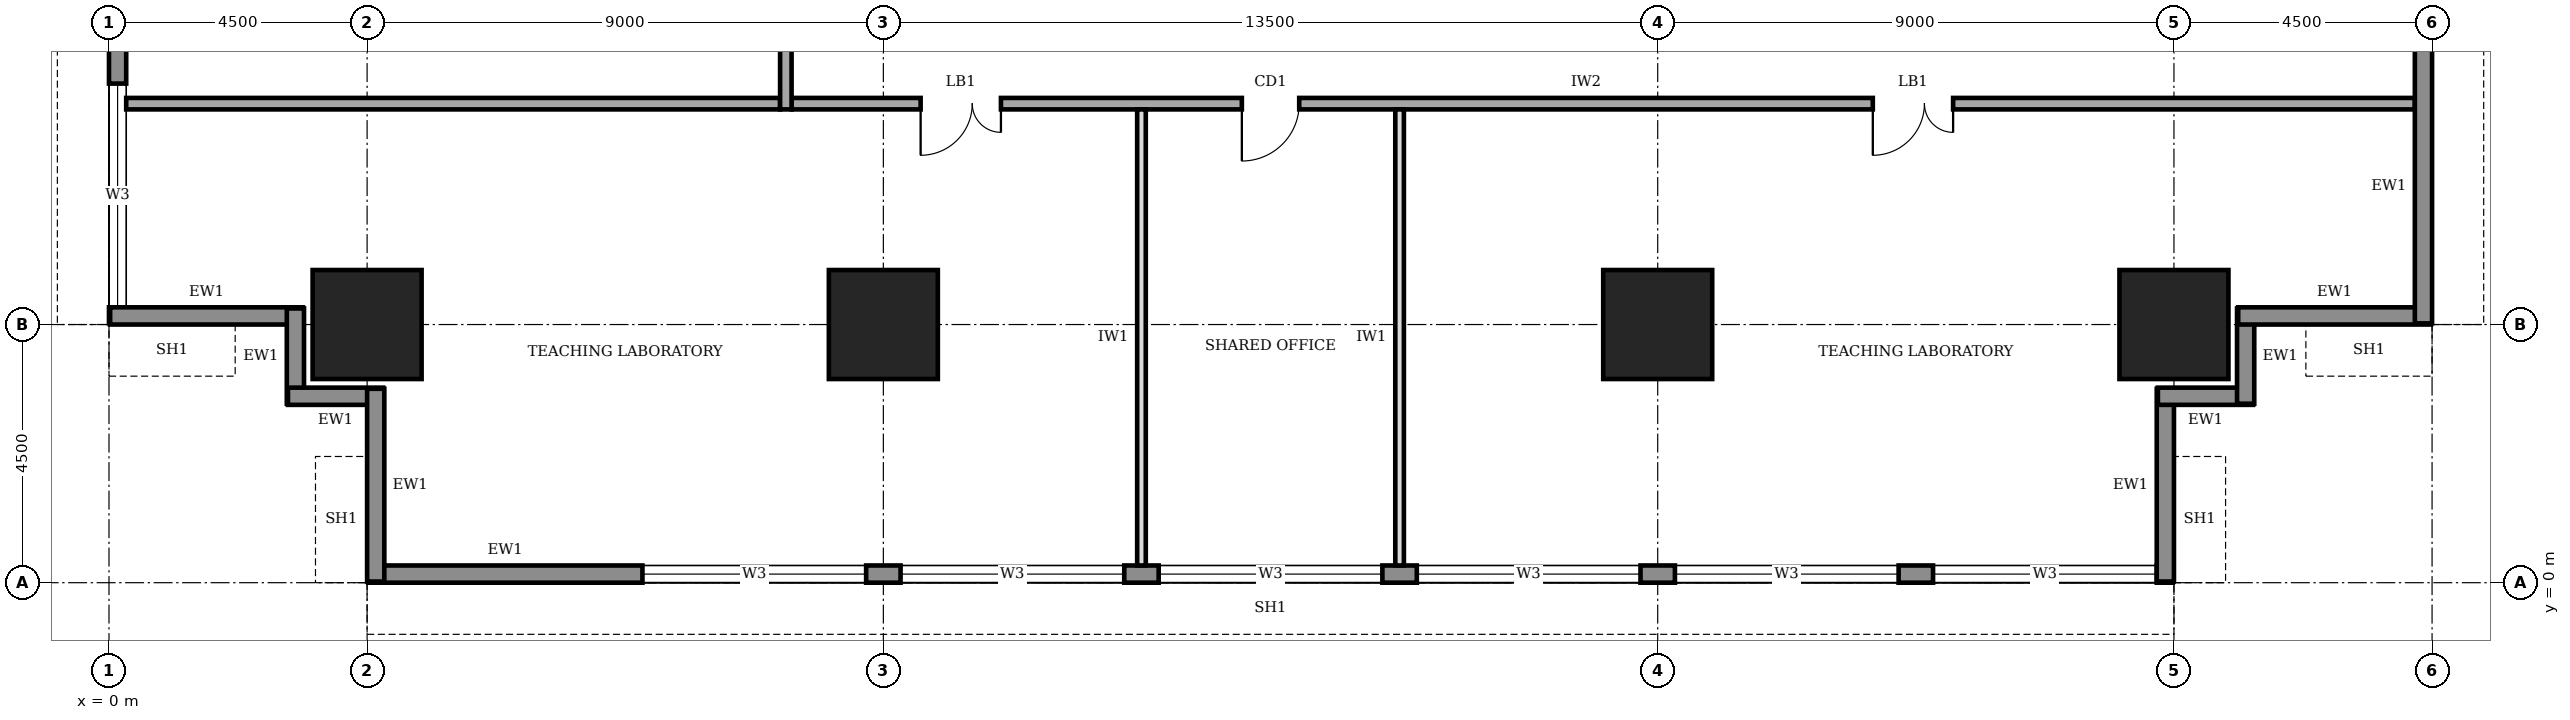
"""IFC4 building model, lengths in metres.
Left out: names, types, materials, properties, quantities, classifications, styles, units other than length and angle.
Written with IfcOpenShell. Run it as: python <this file> out.ifc"""

import sys

from ifc_helpers import new_model, si_unit, direction, frame, frame_2d, origin, origin_2d, place, context, subcontext, project, spatial, rectangle, extrude, element, fill, save


model = new_model("IFC4")
c1 = context("Model", 3, precision=1e-05, world=origin(), true_north=direction((0.0, 1.0)))
c2 = subcontext(c1, "Body", "Model", "MODEL_VIEW")
j1 = project(units=[si_unit("LENGTHUNIT", "METRE"), si_unit("PLANEANGLEUNIT", "RADIAN")], contexts=[c1])
p1 = place(None, origin())
s1 = spatial("IfcSite", under=j1, at=p1, CompositionType="ELEMENT")
p2 = place(p1, origin())
s2 = spatial("IfcBuilding", under=s1, at=p2, CompositionType="ELEMENT")
p3 = place(p2, frame((0.0, 0.0, 97.0)))
s3 = spatial("IfcBuildingStorey", under=s2, at=p3, CompositionType="ELEMENT", Elevation=97.0)
for number, where, z_axis, x_axis in (
    (1, (4.5, 4.5, 0.0), (0.0, 0.0, 1.0), (1.0, 0.0, 0.0)),
    (2, (13.5, 4.5, 0.0), (0.0, 0.0, 1.0), (1.0, 0.0, 0.0)),
    (3, (27.0, 4.5, 0.0), (0.0, 0.0, 1.0), (1.0, 0.0, 0.0)),
    (4, (36.0, 4.5, 0.0), (0.0, 0.0, 1.0), (1.0, 0.0, 0.0)),
):
    element("IfcColumn", number, at=place(p3, frame(where, z_axis=z_axis, x_axis=x_axis)), inside=s3, PredefinedType="COLUMN", context=c2, shape_type="SweptSolid", body=[
        extrude(rectangle(XDim=1.9, YDim=1.9, at=origin_2d()), origin(), (0.0, 0.0, 1.0), 4.0),
    ])
p4 = place(p3, frame((4.52, 0.15, 0.0), z_axis=(0.0, 0.0, 1.0), x_axis=(1.0, 0.0, 0.0)))
e5 = element("IfcWall", 5, at=p4, inside=s3, PredefinedType="STANDARD", context=c2, shape_type="SweptSolid", body=[
    extrude(rectangle(XDim=31.46, YDim=0.3, at=frame_2d((15.73, 0.0))), origin(), (0.0, 0.0, 1.0), 3.75),
])
p5 = place(p4, frame((4.78, 0.0, 0.95)))
e6 = element("IfcOpeningElement", 6, at=p5, cuts=e5, PredefinedType="OPENING", context=c2, shape_type="SweptSolid", body=[
    extrude(rectangle(XDim=3.9, YDim=1.8, at=frame_2d((1.95, 0.9))), frame((0.0, 0.16, 0.0), z_axis=(0.0, -1.0, 0.0), x_axis=(1.0, 0.0, 0.0)), (0.0, 0.0, 1.0), 0.32),
])
p6 = place(p4, frame((9.28, 0.0, 0.95)))
e7 = element("IfcOpeningElement", 7, at=p6, cuts=e5, PredefinedType="OPENING", context=c2, shape_type="SweptSolid", body=[
    extrude(rectangle(XDim=3.9, YDim=1.8, at=frame_2d((1.95, 0.9))), frame((0.0, 0.16, 0.0), z_axis=(0.0, -1.0, 0.0), x_axis=(1.0, 0.0, 0.0)), (0.0, 0.0, 1.0), 0.32),
])
p7 = place(p4, frame((13.78, 0.0, 0.95)))
e8 = element("IfcOpeningElement", 8, at=p7, cuts=e5, PredefinedType="OPENING", context=c2, shape_type="SweptSolid", body=[
    extrude(rectangle(XDim=3.9, YDim=1.8, at=frame_2d((1.95, 0.9))), frame((0.0, 0.16, 0.0), z_axis=(0.0, -1.0, 0.0), x_axis=(1.0, 0.0, 0.0)), (0.0, 0.0, 1.0), 0.32),
])
p8 = place(p4, frame((18.28, 0.0, 0.95)))
e9 = element("IfcOpeningElement", 9, at=p8, cuts=e5, PredefinedType="OPENING", context=c2, shape_type="SweptSolid", body=[
    extrude(rectangle(XDim=3.9, YDim=1.8, at=frame_2d((1.95, 0.9))), frame((0.0, 0.16, 0.0), z_axis=(0.0, -1.0, 0.0), x_axis=(1.0, 0.0, 0.0)), (0.0, 0.0, 1.0), 0.32),
])
p9 = place(p4, frame((22.78, 0.0, 0.95)))
e10 = element("IfcOpeningElement", 10, at=p9, cuts=e5, PredefinedType="OPENING", context=c2, shape_type="SweptSolid", body=[
    extrude(rectangle(XDim=3.9, YDim=1.8, at=frame_2d((1.95, 0.9))), frame((0.0, 0.16, 0.0), z_axis=(0.0, -1.0, 0.0), x_axis=(1.0, 0.0, 0.0)), (0.0, 0.0, 1.0), 0.32),
])
p10 = place(p4, frame((27.28, 0.0, 0.95)))
e11 = element("IfcOpeningElement", 11, at=p10, cuts=e5, PredefinedType="OPENING", context=c2, shape_type="SweptSolid", body=[
    extrude(rectangle(XDim=3.9, YDim=1.8, at=frame_2d((1.95, 0.9))), frame((0.0, 0.16, 0.0), z_axis=(0.0, -1.0, 0.0), x_axis=(1.0, 0.0, 0.0)), (0.0, 0.0, 1.0), 0.32),
])
p11 = place(p3, frame((35.85, 0.02, 0.0), z_axis=(0.0, 0.0, 1.0), x_axis=(0.0, 1.0, 0.0)))
e12 = element("IfcWall", 12, at=p11, inside=s3, PredefinedType="STANDARD", context=c2, shape_type="SweptSolid", body=[
    extrude(rectangle(XDim=3.36, YDim=0.3, at=frame_2d((1.68, 0.0))), origin(), (0.0, 0.0, 1.0), 2.85),
])
for number, where, z_axis, x_axis in (
    (13, (35.72, 3.25, 0.0), (0.0, 0.0, 1.0), (1.0, 0.0, 0.0)),
    (14, (37.25, 3.12, 0.0), (0.0, 0.0, 1.0), (0.0, 1.0, 0.0)),
):
    element("IfcWall", number, at=place(p3, frame(where, z_axis=z_axis, x_axis=x_axis)), inside=s3, PredefinedType="STANDARD", context=c2, shape_type="SweptSolid", body=[
        extrude(rectangle(XDim=1.66, YDim=0.3, at=frame_2d((0.83, 0.0))), origin(), (0.0, 0.0, 1.0), 3.75),
    ])
p12 = place(p3, frame((37.12, 4.65, 0.0), z_axis=(0.0, 0.0, 1.0), x_axis=(1.0, 0.0, 0.0)))
e15 = element("IfcWall", 15, at=p12, inside=s3, PredefinedType="STANDARD", context=c2, shape_type="SweptSolid", body=[
    extrude(rectangle(XDim=3.36, YDim=0.3, at=frame_2d((1.68, 0.0))), origin(), (0.0, 0.0, 1.0), 2.85),
])
p13 = place(p3, frame((40.35, 4.52, 0.0), z_axis=(0.0, 0.0, 1.0), x_axis=(0.0, 1.0, 0.0)))
e16 = element("IfcWall", 16, at=p13, inside=s3, PredefinedType="STANDARD", context=c2, shape_type="SweptSolid", body=[
    extrude(rectangle(XDim=31.46, YDim=0.3, at=frame_2d((15.73, 0.0))), origin(), (0.0, 0.0, 1.0), 3.75),
])
p14 = place(p13, frame((4.78, 0.0, 0.95)))
e17 = element("IfcOpeningElement", 17, at=p14, cuts=e16, PredefinedType="OPENING", context=c2, shape_type="SweptSolid", body=[
    extrude(rectangle(XDim=3.9, YDim=1.8, at=frame_2d((1.95, 0.9))), frame((0.0, 0.16, 0.0), z_axis=(0.0, -1.0, 0.0), x_axis=(1.0, 0.0, 0.0)), (0.0, 0.0, 1.0), 0.32),
])
p15 = place(p13, frame((9.28, 0.0, 0.95)))
e18 = element("IfcOpeningElement", 18, at=p15, cuts=e16, PredefinedType="OPENING", context=c2, shape_type="SweptSolid", body=[
    extrude(rectangle(XDim=3.9, YDim=1.8, at=frame_2d((1.95, 0.9))), frame((0.0, 0.16, 0.0), z_axis=(0.0, -1.0, 0.0), x_axis=(1.0, 0.0, 0.0)), (0.0, 0.0, 1.0), 0.32),
])
p16 = place(p13, frame((13.78, 0.0, 0.95)))
e19 = element("IfcOpeningElement", 19, at=p16, cuts=e16, PredefinedType="OPENING", context=c2, shape_type="SweptSolid", body=[
    extrude(rectangle(XDim=3.9, YDim=1.8, at=frame_2d((1.95, 0.9))), frame((0.0, 0.16, 0.0), z_axis=(0.0, -1.0, 0.0), x_axis=(1.0, 0.0, 0.0)), (0.0, 0.0, 1.0), 0.32),
])
p17 = place(p13, frame((18.28, 0.0, 0.95)))
e20 = element("IfcOpeningElement", 20, at=p17, cuts=e16, PredefinedType="OPENING", context=c2, shape_type="SweptSolid", body=[
    extrude(rectangle(XDim=3.9, YDim=1.8, at=frame_2d((1.95, 0.9))), frame((0.0, 0.16, 0.0), z_axis=(0.0, -1.0, 0.0), x_axis=(1.0, 0.0, 0.0)), (0.0, 0.0, 1.0), 0.32),
])
p18 = place(p13, frame((22.78, 0.0, 0.95)))
e21 = element("IfcOpeningElement", 21, at=p18, cuts=e16, PredefinedType="OPENING", context=c2, shape_type="SweptSolid", body=[
    extrude(rectangle(XDim=3.9, YDim=1.8, at=frame_2d((1.95, 0.9))), frame((0.0, 0.16, 0.0), z_axis=(0.0, -1.0, 0.0), x_axis=(1.0, 0.0, 0.0)), (0.0, 0.0, 1.0), 0.32),
])
p19 = place(p13, frame((27.28, 0.0, 0.95)))
e22 = element("IfcOpeningElement", 22, at=p19, cuts=e16, PredefinedType="OPENING", context=c2, shape_type="SweptSolid", body=[
    extrude(rectangle(XDim=3.9, YDim=1.8, at=frame_2d((1.95, 0.9))), frame((0.0, 0.16, 0.0), z_axis=(0.0, -1.0, 0.0), x_axis=(1.0, 0.0, 0.0)), (0.0, 0.0, 1.0), 0.32),
])
p20 = place(p3, frame((0.15, 35.98, 0.0), z_axis=(0.0, 0.0, 1.0), x_axis=(0.0, -1.0, 0.0)))
e23 = element("IfcWall", 23, at=p20, inside=s3, PredefinedType="STANDARD", context=c2, shape_type="SweptSolid", body=[
    extrude(rectangle(XDim=31.46, YDim=0.3, at=frame_2d((15.73, 0.0))), origin(), (0.0, 0.0, 1.0), 3.75),
])
p21 = place(p20, frame((27.28, 0.0, 0.95)))
e24 = element("IfcOpeningElement", 24, at=p21, cuts=e23, PredefinedType="OPENING", context=c2, shape_type="SweptSolid", body=[
    extrude(rectangle(XDim=3.9, YDim=1.8, at=frame_2d((1.95, 0.9))), frame((0.0, 0.16, 0.0), z_axis=(0.0, -1.0, 0.0), x_axis=(1.0, 0.0, 0.0)), (0.0, 0.0, 1.0), 0.32),
])
p22 = place(p20, frame((22.78, 0.0, 0.95)))
e25 = element("IfcOpeningElement", 25, at=p22, cuts=e23, PredefinedType="OPENING", context=c2, shape_type="SweptSolid", body=[
    extrude(rectangle(XDim=3.9, YDim=1.8, at=frame_2d((1.95, 0.9))), frame((0.0, 0.16, 0.0), z_axis=(0.0, -1.0, 0.0), x_axis=(1.0, 0.0, 0.0)), (0.0, 0.0, 1.0), 0.32),
])
p23 = place(p20, frame((18.28, 0.0, 0.95)))
e26 = element("IfcOpeningElement", 26, at=p23, cuts=e23, PredefinedType="OPENING", context=c2, shape_type="SweptSolid", body=[
    extrude(rectangle(XDim=3.9, YDim=1.8, at=frame_2d((1.95, 0.9))), frame((0.0, 0.16, 0.0), z_axis=(0.0, -1.0, 0.0), x_axis=(1.0, 0.0, 0.0)), (0.0, 0.0, 1.0), 0.32),
])
p24 = place(p20, frame((13.78, 0.0, 0.95)))
e27 = element("IfcOpeningElement", 27, at=p24, cuts=e23, PredefinedType="OPENING", context=c2, shape_type="SweptSolid", body=[
    extrude(rectangle(XDim=3.9, YDim=1.8, at=frame_2d((1.95, 0.9))), frame((0.0, 0.16, 0.0), z_axis=(0.0, -1.0, 0.0), x_axis=(1.0, 0.0, 0.0)), (0.0, 0.0, 1.0), 0.32),
])
p25 = place(p20, frame((9.28, 0.0, 0.95)))
e28 = element("IfcOpeningElement", 28, at=p25, cuts=e23, PredefinedType="OPENING", context=c2, shape_type="SweptSolid", body=[
    extrude(rectangle(XDim=3.9, YDim=1.8, at=frame_2d((1.95, 0.9))), frame((0.0, 0.16, 0.0), z_axis=(0.0, -1.0, 0.0), x_axis=(1.0, 0.0, 0.0)), (0.0, 0.0, 1.0), 0.32),
])
p26 = place(p20, frame((4.78, 0.0, 0.95)))
e29 = element("IfcOpeningElement", 29, at=p26, cuts=e23, PredefinedType="OPENING", context=c2, shape_type="SweptSolid", body=[
    extrude(rectangle(XDim=3.9, YDim=1.8, at=frame_2d((1.95, 0.9))), frame((0.0, 0.16, 0.0), z_axis=(0.0, -1.0, 0.0), x_axis=(1.0, 0.0, 0.0)), (0.0, 0.0, 1.0), 0.32),
])
p27 = place(p3, frame((0.02, 4.65, 0.0), z_axis=(0.0, 0.0, 1.0), x_axis=(1.0, 0.0, 0.0)))
e30 = element("IfcWall", 30, at=p27, inside=s3, PredefinedType="STANDARD", context=c2, shape_type="SweptSolid", body=[
    extrude(rectangle(XDim=3.36, YDim=0.3, at=frame_2d((1.68, 0.0))), origin(), (0.0, 0.0, 1.0), 2.85),
])
for number, where, z_axis, x_axis in (
    (31, (3.25, 4.78, 0.0), (0.0, 0.0, 1.0), (0.0, -1.0, 0.0)),
    (32, (3.12, 3.25, 0.0), (0.0, 0.0, 1.0), (1.0, 0.0, 0.0)),
):
    element("IfcWall", number, at=place(p3, frame(where, z_axis=z_axis, x_axis=x_axis)), inside=s3, PredefinedType="STANDARD", context=c2, shape_type="SweptSolid", body=[
        extrude(rectangle(XDim=1.66, YDim=0.3, at=frame_2d((0.83, 0.0))), origin(), (0.0, 0.0, 1.0), 3.75),
    ])
p28 = place(p3, frame((4.65, 3.38, 0.0), z_axis=(0.0, 0.0, 1.0), x_axis=(0.0, -1.0, 0.0)))
e33 = element("IfcWall", 33, at=p28, inside=s3, PredefinedType="STANDARD", context=c2, shape_type="SweptSolid", body=[
    extrude(rectangle(XDim=3.36, YDim=0.3, at=frame_2d((1.68, 0.0))), origin(), (0.0, 0.0, 1.0), 2.85),
])
p29 = place(p3, frame((11.9, 8.35, 0.0), z_axis=(0.0, 0.0, 1.0), x_axis=(1.0, 0.0, 0.0)))
e34 = element("IfcWall", 34, at=p29, inside=s3, PredefinedType="SOLIDWALL", context=c2, shape_type="SweptSolid", body=[
    extrude(rectangle(XDim=28.3, YDim=0.2, at=frame_2d((14.15, 0.0))), origin(), (0.0, 0.0, 1.0), 3.75),
])
p30 = place(p29, frame((2.25, 0.0, 0.0)))
e35 = element("IfcOpeningElement", 35, at=p30, cuts=e34, PredefinedType="OPENING", context=c2, shape_type="SweptSolid", body=[
    extrude(rectangle(XDim=1.4, YDim=2.1, at=frame_2d((0.7, 1.05))), frame((0.0, 0.11, 0.0), z_axis=(0.0, -1.0, 0.0), x_axis=(1.0, 0.0, 0.0)), (0.0, 0.0, 1.0), 0.22),
])
p31 = place(p29, frame((7.85, 0.0, 0.0)))
e36 = element("IfcOpeningElement", 36, at=p31, cuts=e34, PredefinedType="OPENING", context=c2, shape_type="SweptSolid", body=[
    extrude(rectangle(XDim=1.0, YDim=2.1, at=frame_2d((0.5, 1.05))), frame((0.0, 0.11, 0.0), z_axis=(0.0, -1.0, 0.0), x_axis=(1.0, 0.0, 0.0)), (0.0, 0.0, 1.0), 0.22),
])
p32 = place(p29, frame((18.85, 0.0, 0.0)))
e37 = element("IfcOpeningElement", 37, at=p32, cuts=e34, PredefinedType="OPENING", context=c2, shape_type="SweptSolid", body=[
    extrude(rectangle(XDim=1.4, YDim=2.1, at=frame_2d((0.7, 1.05))), frame((0.0, 0.11, 0.0), z_axis=(0.0, -1.0, 0.0), x_axis=(1.0, 0.0, 0.0)), (0.0, 0.0, 1.0), 0.22),
])
p33 = place(p3, frame((11.8, 32.05, 0.0), z_axis=(0.0, 0.0, 1.0), x_axis=(0.0, -1.0, 0.0)))
e38 = element("IfcWall", 38, at=p33, inside=s3, PredefinedType="SOLIDWALL", context=c2, shape_type="SweptSolid", body=[
    extrude(rectangle(XDim=23.8, YDim=0.2, at=frame_2d((11.9, 0.0))), origin(), (0.0, 0.0, 1.0), 3.75),
])
p34 = place(p33, frame((20.675, 0.0, 0.0)))
e39 = element("IfcOpeningElement", 39, at=p34, cuts=e38, PredefinedType="OPENING", context=c2, shape_type="SweptSolid", body=[
    extrude(rectangle(XDim=1.0, YDim=2.1, at=frame_2d((0.5, 1.05))), frame((0.0, 0.11, 0.0), z_axis=(0.0, -1.0, 0.0), x_axis=(1.0, 0.0, 0.0)), (0.0, 0.0, 1.0), 0.22),
])
p35 = place(p33, frame((16.95, 0.0, 0.0)))
e40 = element("IfcOpeningElement", 40, at=p35, cuts=e38, PredefinedType="OPENING", context=c2, shape_type="SweptSolid", body=[
    extrude(rectangle(XDim=1.0, YDim=2.1, at=frame_2d((0.5, 1.05))), frame((0.0, 0.11, 0.0), z_axis=(0.0, -1.0, 0.0), x_axis=(1.0, 0.0, 0.0)), (0.0, 0.0, 1.0), 0.22),
])
p36 = place(p33, frame((13.95, 0.0, 0.0)))
e41 = element("IfcOpeningElement", 41, at=p36, cuts=e38, PredefinedType="OPENING", context=c2, shape_type="SweptSolid", body=[
    extrude(rectangle(XDim=0.9, YDim=2.1, at=frame_2d((0.45, 1.05))), frame((0.0, 0.11, 0.0), z_axis=(0.0, -1.0, 0.0), x_axis=(1.0, 0.0, 0.0)), (0.0, 0.0, 1.0), 0.22),
])
p37 = place(p33, frame((10.9, 0.0, 0.0)))
e42 = element("IfcOpeningElement", 42, at=p37, cuts=e38, PredefinedType="OPENING", context=c2, shape_type="SweptSolid", body=[
    extrude(rectangle(XDim=0.9, YDim=2.1, at=frame_2d((0.45, 1.05))), frame((0.0, 0.11, 0.0), z_axis=(0.0, -1.0, 0.0), x_axis=(1.0, 0.0, 0.0)), (0.0, 0.0, 1.0), 0.22),
])
p38 = place(p33, frame((6.2, 0.0, 0.0)))
e43 = element("IfcOpeningElement", 43, at=p38, cuts=e38, PredefinedType="OPENING", context=c2, shape_type="SweptSolid", body=[
    extrude(rectangle(XDim=0.9, YDim=2.1, at=frame_2d((0.45, 1.05))), frame((0.0, 0.11, 0.0), z_axis=(0.0, -1.0, 0.0), x_axis=(1.0, 0.0, 0.0)), (0.0, 0.0, 1.0), 0.22),
])
p39 = place(p33, frame((8.75, 0.0, 0.0)))
e44 = element("IfcOpeningElement", 44, at=p39, cuts=e38, PredefinedType="OPENING", context=c2, shape_type="SweptSolid", body=[
    extrude(rectangle(XDim=1.0, YDim=2.1, at=frame_2d((0.5, 1.05))), frame((0.0, 0.11, 0.0), z_axis=(0.0, -1.0, 0.0), x_axis=(1.0, 0.0, 0.0)), (0.0, 0.0, 1.0), 0.22),
])
p40 = place(p33, frame((1.925, 0.0, 0.0)))
e45 = element("IfcOpeningElement", 45, at=p40, cuts=e38, PredefinedType="OPENING", context=c2, shape_type="SweptSolid", body=[
    extrude(rectangle(XDim=1.0, YDim=2.1, at=frame_2d((0.5, 1.05))), frame((0.0, 0.11, 0.0), z_axis=(0.0, -1.0, 0.0), x_axis=(1.0, 0.0, 0.0)), (0.0, 0.0, 1.0), 0.22),
])
p41 = place(p3, frame((0.3, 8.35, 0.0), z_axis=(0.0, 0.0, 1.0), x_axis=(1.0, 0.0, 0.0)))
e46 = element("IfcWall", 46, at=p41, inside=s3, PredefinedType="SOLIDWALL", context=c2, shape_type="SweptSolid", body=[
    extrude(rectangle(XDim=11.4, YDim=0.2, at=frame_2d((5.7, 0.0))), origin(), (0.0, 0.0, 1.0), 3.75),
])
for number, where, z_axis, x_axis in (
    (47, (18.0, 0.3, 0.0), (0.0, 0.0, 1.0), (0.0, 1.0, 0.0)),
    (48, (22.5, 0.3, 0.0), (0.0, 0.0, 1.0), (0.0, 1.0, 0.0)),
):
    element("IfcWall", number, at=place(p3, frame(where, z_axis=z_axis, x_axis=x_axis)), inside=s3, PredefinedType="PARTITIONING", context=c2, shape_type="SweptSolid", body=[
        extrude(rectangle(XDim=7.95, YDim=0.15, at=frame_2d((3.975, 0.0))), origin(), (0.0, 0.0, 1.0), 3.75),
    ])
p42 = place(p5, origin())
e49 = element("IfcWindow", 49, at=p42, inside=s3, PartitioningType="SINGLE_PANEL", PredefinedType="WINDOW", context=c2, shape_type="SweptSolid", body=[
    extrude(rectangle(XDim=3.9, YDim=1.8, at=frame_2d((1.95, 0.9))), frame((0.0, 0.03, 0.0), z_axis=(0.0, -1.0, 0.0), x_axis=(1.0, 0.0, 0.0)), (0.0, 0.0, 1.0), 0.06),
])
fill(e6, e49)
p43 = place(p6, origin())
e50 = element("IfcWindow", 50, at=p43, inside=s3, PartitioningType="SINGLE_PANEL", PredefinedType="WINDOW", context=c2, shape_type="SweptSolid", body=[
    extrude(rectangle(XDim=3.9, YDim=1.8, at=frame_2d((1.95, 0.9))), frame((0.0, 0.03, 0.0), z_axis=(0.0, -1.0, 0.0), x_axis=(1.0, 0.0, 0.0)), (0.0, 0.0, 1.0), 0.06),
])
fill(e7, e50)
p44 = place(p7, origin())
e51 = element("IfcWindow", 51, at=p44, inside=s3, PartitioningType="SINGLE_PANEL", PredefinedType="WINDOW", context=c2, shape_type="SweptSolid", body=[
    extrude(rectangle(XDim=3.9, YDim=1.8, at=frame_2d((1.95, 0.9))), frame((0.0, 0.03, 0.0), z_axis=(0.0, -1.0, 0.0), x_axis=(1.0, 0.0, 0.0)), (0.0, 0.0, 1.0), 0.06),
])
fill(e8, e51)
p45 = place(p8, origin())
e52 = element("IfcWindow", 52, at=p45, inside=s3, PartitioningType="SINGLE_PANEL", PredefinedType="WINDOW", context=c2, shape_type="SweptSolid", body=[
    extrude(rectangle(XDim=3.9, YDim=1.8, at=frame_2d((1.95, 0.9))), frame((0.0, 0.03, 0.0), z_axis=(0.0, -1.0, 0.0), x_axis=(1.0, 0.0, 0.0)), (0.0, 0.0, 1.0), 0.06),
])
fill(e9, e52)
p46 = place(p9, origin())
e53 = element("IfcWindow", 53, at=p46, inside=s3, PartitioningType="SINGLE_PANEL", PredefinedType="WINDOW", context=c2, shape_type="SweptSolid", body=[
    extrude(rectangle(XDim=3.9, YDim=1.8, at=frame_2d((1.95, 0.9))), frame((0.0, 0.03, 0.0), z_axis=(0.0, -1.0, 0.0), x_axis=(1.0, 0.0, 0.0)), (0.0, 0.0, 1.0), 0.06),
])
fill(e10, e53)
p47 = place(p10, origin())
e54 = element("IfcWindow", 54, at=p47, inside=s3, PartitioningType="SINGLE_PANEL", PredefinedType="WINDOW", context=c2, shape_type="SweptSolid", body=[
    extrude(rectangle(XDim=3.9, YDim=1.8, at=frame_2d((1.95, 0.9))), frame((0.0, 0.03, 0.0), z_axis=(0.0, -1.0, 0.0), x_axis=(1.0, 0.0, 0.0)), (0.0, 0.0, 1.0), 0.06),
])
fill(e11, e54)
p48 = place(p21, origin())
e55 = element("IfcWindow", 55, at=p48, inside=s3, PartitioningType="SINGLE_PANEL", PredefinedType="WINDOW", context=c2, shape_type="SweptSolid", body=[
    extrude(rectangle(XDim=3.9, YDim=1.8, at=frame_2d((1.95, 0.9))), frame((0.0, 0.03, 0.0), z_axis=(0.0, -1.0, 0.0), x_axis=(1.0, 0.0, 0.0)), (0.0, 0.0, 1.0), 0.06),
])
fill(e24, e55)
p49 = place(p30, frame((1.4, 0.0, 0.0), z_axis=(0.0, 0.0, 1.0), x_axis=(-1.0, 0.0, 0.0)))
e56 = element("IfcDoor", 56, at=p49, inside=s3, OperationType="DOUBLE_DOOR_SINGLE_SWING", PredefinedType="DOOR", context=c2, shape_type="SweptSolid", body=[
    extrude(rectangle(XDim=1.4, YDim=2.1, at=frame_2d((0.7, 1.05))), frame((0.0, 0.025, 0.0), z_axis=(0.0, -1.0, 0.0), x_axis=(1.0, 0.0, 0.0)), (0.0, 0.0, 1.0), 0.05),
])
fill(e35, e56)
p50 = place(p31, frame((1.0, 0.0, 0.0), z_axis=(0.0, 0.0, 1.0), x_axis=(-1.0, 0.0, 0.0)))
e57 = element("IfcDoor", 57, at=p50, inside=s3, OperationType="SINGLE_SWING_RIGHT", PredefinedType="DOOR", context=c2, shape_type="SweptSolid", body=[
    extrude(rectangle(XDim=1.0, YDim=2.1, at=frame_2d((0.5, 1.05))), frame((0.0, 0.025, 0.0), z_axis=(0.0, -1.0, 0.0), x_axis=(1.0, 0.0, 0.0)), (0.0, 0.0, 1.0), 0.05),
])
fill(e36, e57)
p51 = place(p32, frame((1.4, 0.0, 0.0), z_axis=(0.0, 0.0, 1.0), x_axis=(-1.0, 0.0, 0.0)))
e58 = element("IfcDoor", 58, at=p51, inside=s3, OperationType="DOUBLE_DOOR_SINGLE_SWING", PredefinedType="DOOR", context=c2, shape_type="SweptSolid", body=[
    extrude(rectangle(XDim=1.4, YDim=2.1, at=frame_2d((0.7, 1.05))), frame((0.0, 0.025, 0.0), z_axis=(0.0, -1.0, 0.0), x_axis=(1.0, 0.0, 0.0)), (0.0, 0.0, 1.0), 0.05),
])
fill(e37, e58)
save(model, sys.argv[1])
